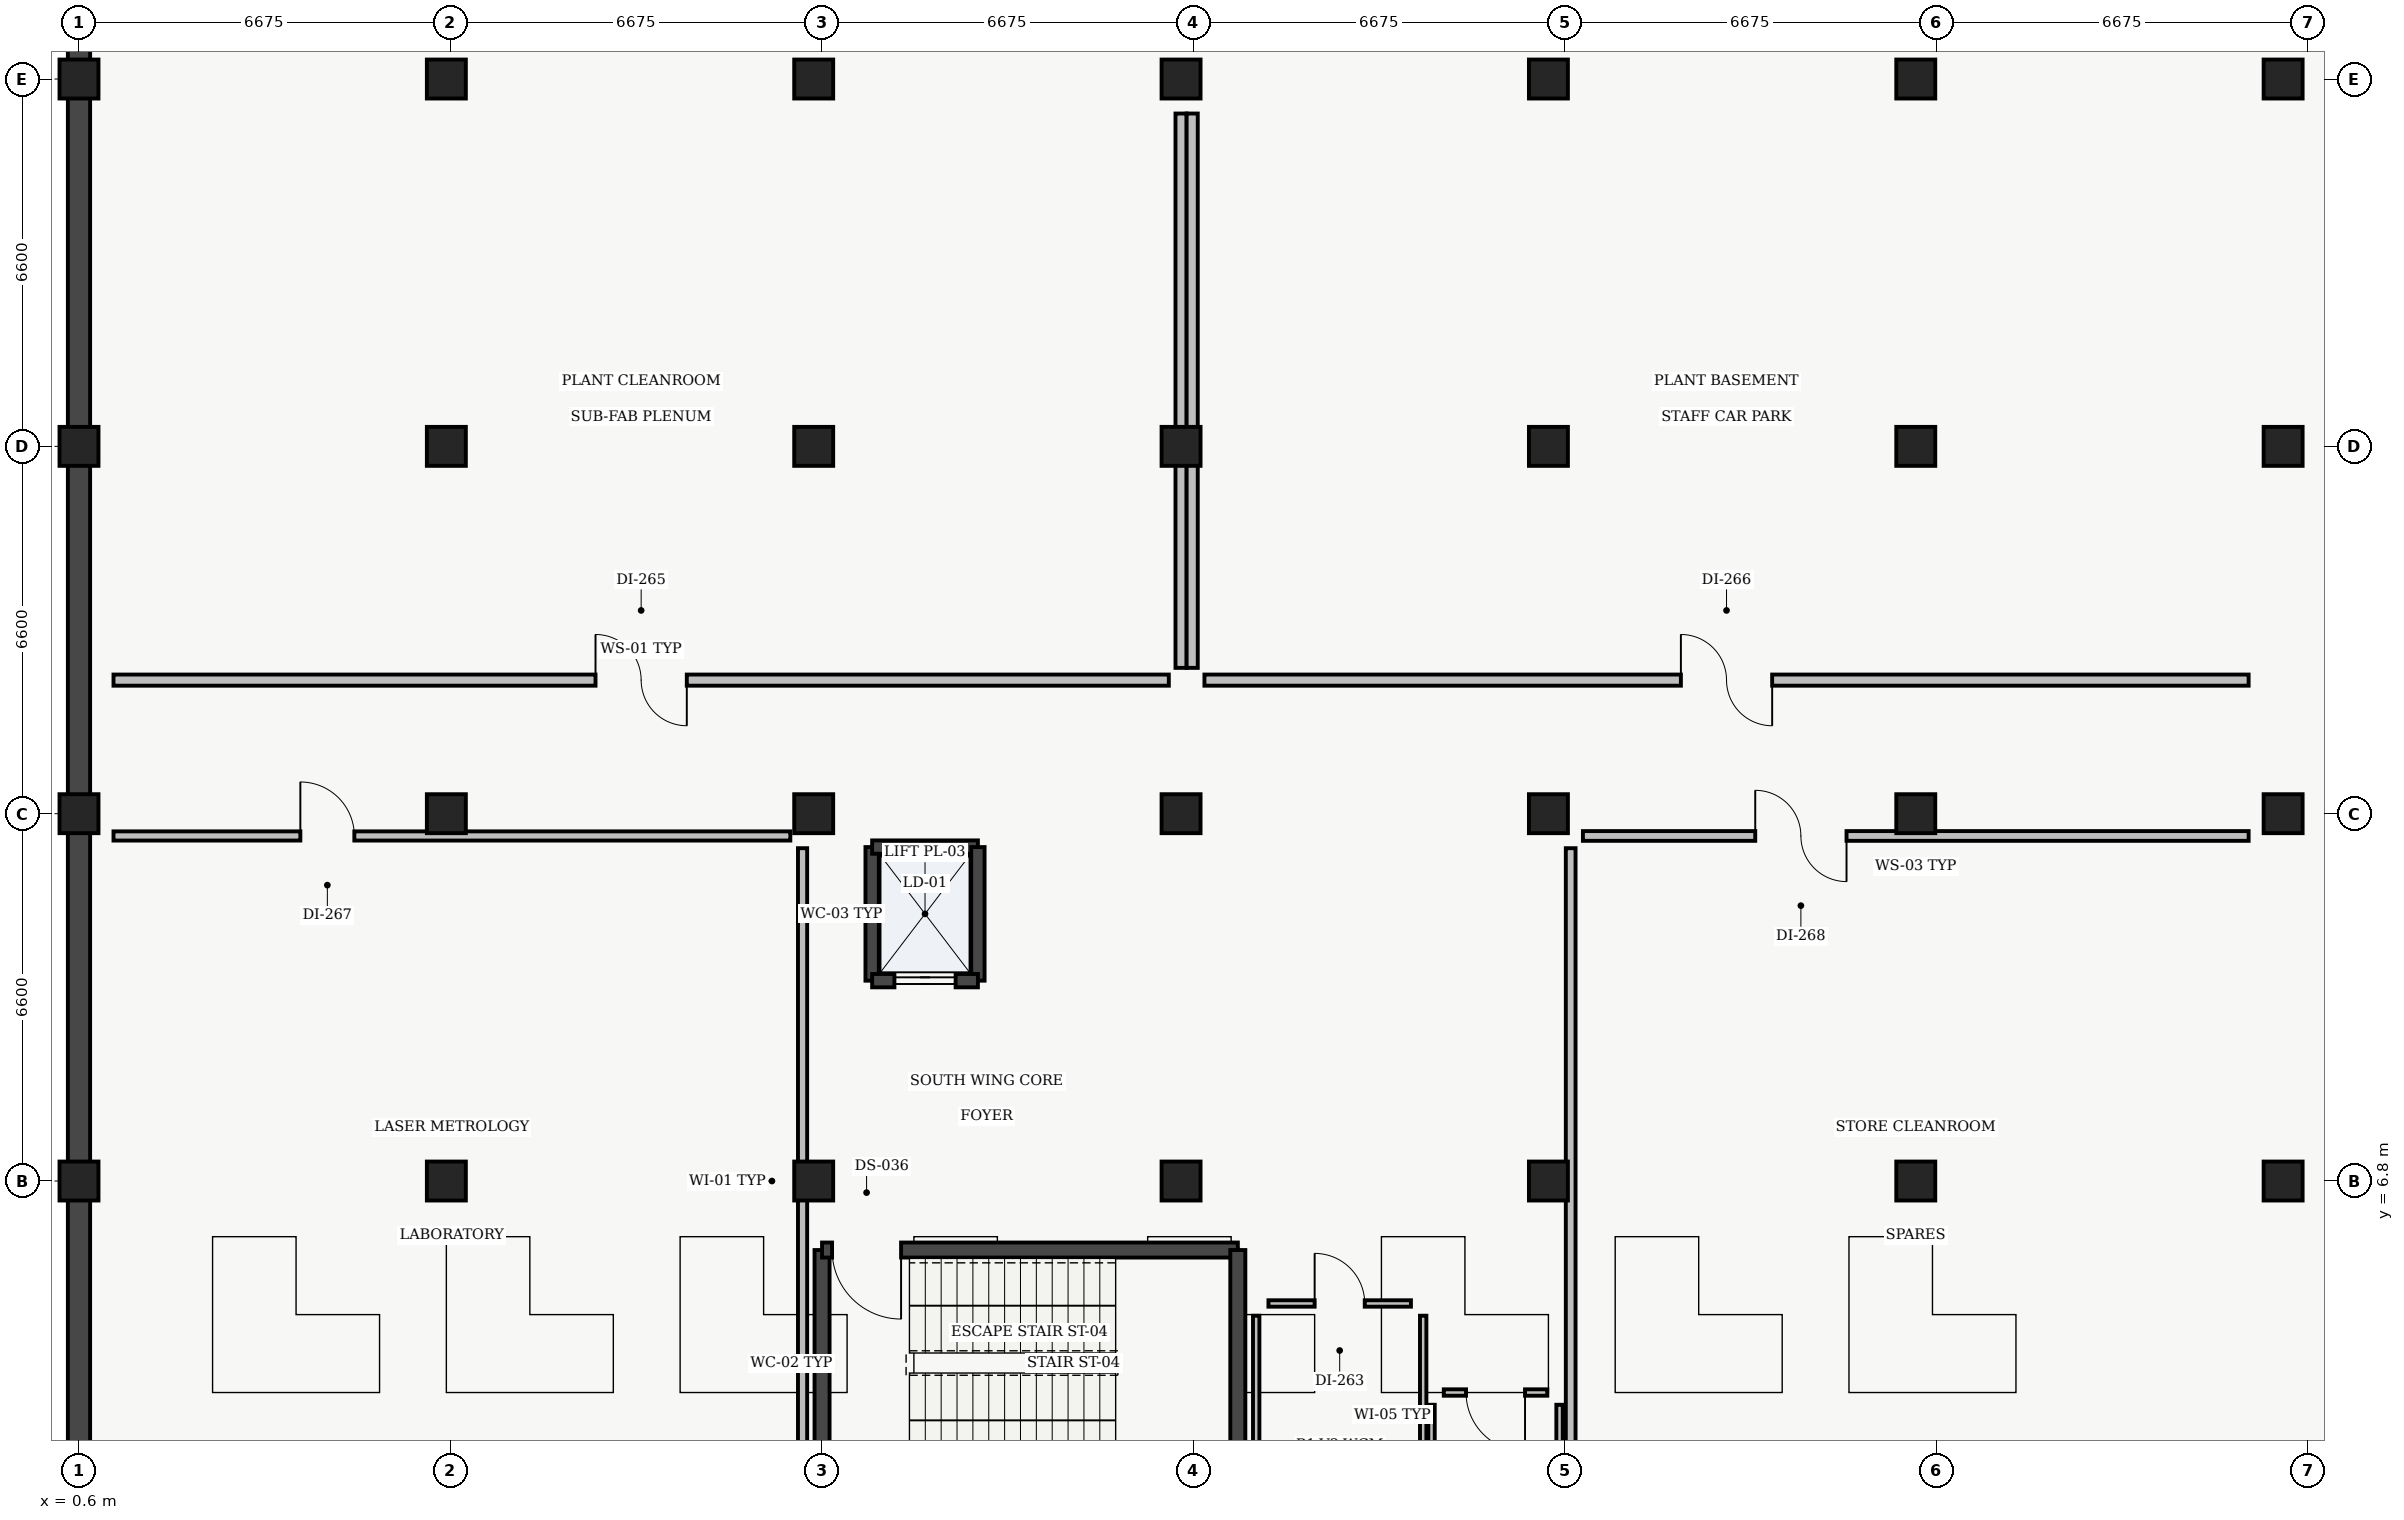
"""IFC4 building model, lengths in metres.
Left out: names, types, materials, properties, quantities, classifications, styles, units other than length and angle.
Written with IfcOpenShell. Run it as: python <this file> out.ifc"""

import sys

from ifc_helpers import new_model, si_unit, direction, frame, frame_2d, origin, origin_2d, place, context, subcontext, project, spatial, rectangle, extrude, element, fill, save


model = new_model("IFC4")
c1 = context("Model", 3, precision=1e-05, world=origin(), true_north=direction((0.0, 1.0)))
c2 = subcontext(c1, "Body", "Model", "MODEL_VIEW")
j1 = project(units=[si_unit("LENGTHUNIT", "METRE"), si_unit("PLANEANGLEUNIT", "RADIAN")], contexts=[c1])
p1 = place(None, origin())
s1 = spatial("IfcSite", under=j1, at=p1, CompositionType="ELEMENT")
p2 = place(p1, origin())
s2 = spatial("IfcBuilding", under=s1, at=p2, CompositionType="ELEMENT")
p3 = place(p2, frame((0.0, 0.0, -4.8)))
s3 = spatial("IfcBuildingStorey", under=s2, at=p3, CompositionType="ELEMENT", Elevation=-4.8)
for number, where, z_axis, x_axis in (
    (1, (0.6, 6.8, 0.0), (0.0, 0.0, 1.0), (1.0, 0.0, 0.0)),
    (2, (0.6, 13.4, 0.0), (0.0, 0.0, 1.0), (1.0, 0.0, 0.0)),
    (3, (0.6, 20.0, 0.0), (0.0, 0.0, 1.0), (1.0, 0.0, 0.0)),
    (4, (0.6, 26.6, 0.0), (0.0, 0.0, 1.0), (1.0, 0.0, 0.0)),
    (5, (7.2, 6.8, 0.0), (0.0, 0.0, 1.0), (1.0, 0.0, 0.0)),
    (6, (7.2, 13.4, 0.0), (0.0, 0.0, 1.0), (1.0, 0.0, 0.0)),
    (7, (7.2, 20.0, 0.0), (0.0, 0.0, 1.0), (1.0, 0.0, 0.0)),
    (8, (7.2, 26.6, 0.0), (0.0, 0.0, 1.0), (1.0, 0.0, 0.0)),
    (9, (13.8, 6.8, 0.0), (0.0, 0.0, 1.0), (1.0, 0.0, 0.0)),
    (10, (13.8, 13.4, 0.0), (0.0, 0.0, 1.0), (1.0, 0.0, 0.0)),
    (11, (13.8, 20.0, 0.0), (0.0, 0.0, 1.0), (1.0, 0.0, 0.0)),
    (12, (13.8, 26.6, 0.0), (0.0, 0.0, 1.0), (1.0, 0.0, 0.0)),
    (13, (20.4, 6.8, 0.0), (0.0, 0.0, 1.0), (1.0, 0.0, 0.0)),
    (14, (20.4, 13.4, 0.0), (0.0, 0.0, 1.0), (1.0, 0.0, 0.0)),
    (15, (20.4, 20.0, 0.0), (0.0, 0.0, 1.0), (1.0, 0.0, 0.0)),
    (16, (20.4, 26.6, 0.0), (0.0, 0.0, 1.0), (1.0, 0.0, 0.0)),
    (17, (27.0, 6.8, 0.0), (0.0, 0.0, 1.0), (1.0, 0.0, 0.0)),
    (18, (27.0, 13.4, 0.0), (0.0, 0.0, 1.0), (1.0, 0.0, 0.0)),
    (19, (27.0, 20.0, 0.0), (0.0, 0.0, 1.0), (1.0, 0.0, 0.0)),
    (20, (27.0, 26.6, 0.0), (0.0, 0.0, 1.0), (1.0, 0.0, 0.0)),
    (21, (33.6, 6.8, 0.0), (0.0, 0.0, 1.0), (1.0, 0.0, 0.0)),
    (22, (33.6, 13.4, 0.0), (0.0, 0.0, 1.0), (1.0, 0.0, 0.0)),
    (23, (33.6, 20.0, 0.0), (0.0, 0.0, 1.0), (1.0, 0.0, 0.0)),
    (24, (33.6, 26.6, 0.0), (0.0, 0.0, 1.0), (1.0, 0.0, 0.0)),
    (25, (40.2, 6.8, 0.0), (0.0, 0.0, 1.0), (1.0, 0.0, 0.0)),
    (26, (40.2, 13.4, 0.0), (0.0, 0.0, 1.0), (1.0, 0.0, 0.0)),
    (27, (40.2, 20.0, 0.0), (0.0, 0.0, 1.0), (1.0, 0.0, 0.0)),
    (28, (40.2, 26.6, 0.0), (0.0, 0.0, 1.0), (1.0, 0.0, 0.0)),
):
    element("IfcColumn", number, at=place(p3, frame(where, z_axis=z_axis, x_axis=x_axis)), inside=s3, PredefinedType="COLUMN", context=c2, shape_type="SweptSolid", body=[
        extrude(rectangle(XDim=0.7, YDim=0.7, at=origin_2d()), origin(), (0.0, 0.0, 1.0), 4.6),
    ])
p4 = place(p3, frame((0.6, 0.2, 0.0), z_axis=(0.0, 0.0, 1.0), x_axis=(0.0, 1.0, 0.0)))
e29 = element("IfcWall", 29, at=p4, inside=s3, PredefinedType="USERDEFINED", context=c2, shape_type="SweptSolid", body=[
    extrude(rectangle(XDim=61.4, YDim=0.4, at=frame_2d((30.7, 0.0))), origin(), (0.0, 0.0, 1.0), 4.58),
])
p5 = place(p3, frame((13.95, 1.5, 0.0), z_axis=(0.0, 0.0, 1.0), x_axis=(0.0, 1.0, 0.0)))
e30 = element("IfcWall", 30, at=p5, inside=s3, PredefinedType="SHEAR", context=c2, shape_type="SweptSolid", body=[
    extrude(rectangle(XDim=4.06, YDim=0.27, at=frame_2d((2.03, 0.0))), origin(), (0.0, 0.0, 1.0), 4.58),
])
p6 = place(p3, frame((13.95, 5.56, 0.0), z_axis=(0.0, 0.0, 1.0), x_axis=(1.0, 0.0, 0.0)))
e31 = element("IfcWall", 31, at=p6, inside=s3, PredefinedType="SHEAR", context=c2, shape_type="SweptSolid", body=[
    extrude(rectangle(XDim=7.47, YDim=0.27, at=frame_2d((3.735, 0.0))), origin(), (0.0, 0.0, 1.0), 4.58),
])
p7 = place(p6, frame((0.18, 0.0, 0.0)))
e32 = element("IfcOpeningElement", 32, at=p7, cuts=e31, PredefinedType="OPENING", context=c2, shape_type="SweptSolid", body=[
    extrude(rectangle(XDim=1.24, YDim=2.15, at=frame_2d((0.62, 1.075))), frame((0.0, 0.135, 0.0), z_axis=(0.0, -1.0, 0.0), x_axis=(1.0, 0.0, 0.0)), (0.0, 0.0, 1.0), 0.27),
])
p8 = place(p3, frame((21.42, 5.56, 0.0), z_axis=(0.0, 0.0, 1.0), x_axis=(0.0, -1.0, 0.0)))
e33 = element("IfcWall", 33, at=p8, inside=s3, PredefinedType="SHEAR", context=c2, shape_type="SweptSolid", body=[
    extrude(rectangle(XDim=4.06, YDim=0.27, at=frame_2d((2.03, 0.0))), origin(), (0.0, 0.0, 1.0), 4.58),
])
p9 = place(p3, frame((14.85, 10.4, 0.0), z_axis=(0.0, 0.0, 1.0), x_axis=(0.0, 1.0, 0.0)))
e34 = element("IfcWall", 34, at=p9, inside=s3, PredefinedType="SHEAR", context=c2, shape_type="SweptSolid", body=[
    extrude(rectangle(XDim=2.4, YDim=0.24, at=frame_2d((1.2, 0.0))), origin(), (0.0, 0.0, 1.0), 4.58),
])
p10 = place(p3, frame((14.85, 12.8, 0.0), z_axis=(0.0, 0.0, 1.0), x_axis=(1.0, 0.0, 0.0)))
e35 = element("IfcWall", 35, at=p10, inside=s3, PredefinedType="SHEAR", context=c2, shape_type="SweptSolid", body=[
    extrude(rectangle(XDim=1.9, YDim=0.24, at=frame_2d((0.95, 0.0))), origin(), (0.0, 0.0, 1.0), 4.58),
])
p11 = place(p3, frame((16.75, 12.8, 0.0), z_axis=(0.0, 0.0, 1.0), x_axis=(0.0, -1.0, 0.0)))
e36 = element("IfcWall", 36, at=p11, inside=s3, PredefinedType="SHEAR", context=c2, shape_type="SweptSolid", body=[
    extrude(rectangle(XDim=2.4, YDim=0.24, at=frame_2d((1.2, 0.0))), origin(), (0.0, 0.0, 1.0), 4.58),
])
p12 = place(p3, frame((16.75, 10.4, 0.0), z_axis=(0.0, 0.0, 1.0), x_axis=(-1.0, 0.0, 0.0)))
e37 = element("IfcWall", 37, at=p12, inside=s3, PredefinedType="SHEAR", context=c2, shape_type="SweptSolid", body=[
    extrude(rectangle(XDim=1.9, YDim=0.24, at=frame_2d((0.95, 0.0))), origin(), (0.0, 0.0, 1.0), 4.58),
])
p13 = place(p12, frame((0.4, 0.0, 0.0)))
e38 = element("IfcOpeningElement", 38, at=p13, cuts=e37, PredefinedType="OPENING", context=c2, shape_type="SweptSolid", body=[
    extrude(rectangle(XDim=1.1, YDim=2.2, at=frame_2d((0.55, 1.1))), frame((0.0, 0.12, 0.0), z_axis=(0.0, -1.0, 0.0), x_axis=(1.0, 0.0, 0.0)), (0.0, 0.0, 1.0), 0.24),
])
p14 = place(p3, frame((24.75, 0.82, 0.0), z_axis=(0.0, 0.0, 1.0), x_axis=(0.0, 1.0, 0.0)))
e39 = element("IfcWall", 39, at=p14, inside=s3, PredefinedType="PARTITIONING", context=c2, shape_type="SweptSolid", body=[
    extrude(rectangle(XDim=3.56, YDim=0.115, at=frame_2d((1.78, 0.0))), origin(), (0.0, 0.0, 1.0), 4.25),
])
p15 = place(p3, frame((24.53, 4.6, 0.0), z_axis=(0.0, 0.0, 1.0), x_axis=(-1.0, 0.0, 0.0)))
e40 = element("IfcWall", 40, at=p15, inside=s3, PredefinedType="PARTITIONING", context=c2, shape_type="SweptSolid", body=[
    extrude(rectangle(XDim=2.56, YDim=0.115, at=frame_2d((1.28, 0.0))), origin(), (0.0, 0.0, 1.0), 4.25),
])
p16 = place(p15, frame((0.83, 0.0, 0.0)))
e41 = element("IfcOpeningElement", 41, at=p16, cuts=e40, PredefinedType="OPENING", context=c2, shape_type="SweptSolid", body=[
    extrude(rectangle(XDim=0.9, YDim=2.1, at=frame_2d((0.45, 1.05))), frame((0.0, 0.058, 0.0), z_axis=(0.0, -1.0, 0.0), x_axis=(1.0, 0.0, 0.0)), (0.0, 0.0, 1.0), 0.115),
])
p17 = place(p3, frame((21.75, 4.38, 0.0), z_axis=(0.0, 0.0, 1.0), x_axis=(0.0, -1.0, 0.0)))
e42 = element("IfcWall", 42, at=p17, inside=s3, PredefinedType="PARTITIONING", context=c2, shape_type="SweptSolid", body=[
    extrude(rectangle(XDim=3.56, YDim=0.115, at=frame_2d((1.78, 0.0))), origin(), (0.0, 0.0, 1.0), 4.25),
])
p18 = place(p3, frame((27.2, 0.82, 0.0), z_axis=(0.0, 0.0, 1.0), x_axis=(0.0, 1.0, 0.0)))
e43 = element("IfcWall", 43, at=p18, inside=s3, PredefinedType="PARTITIONING", context=c2, shape_type="SweptSolid", body=[
    extrude(rectangle(XDim=1.96, YDim=0.115, at=frame_2d((0.98, 0.0))), origin(), (0.0, 0.0, 1.0), 3.935),
])
p19 = place(p3, frame((26.98, 3.0, 0.0), z_axis=(0.0, 0.0, 1.0), x_axis=(-1.0, 0.0, 0.0)))
e44 = element("IfcWall", 44, at=p19, inside=s3, PredefinedType="PARTITIONING", context=c2, shape_type="SweptSolid", body=[
    extrude(rectangle(XDim=1.86, YDim=0.115, at=frame_2d((0.93, 0.0))), origin(), (0.0, 0.0, 1.0), 4.25),
])
p20 = place(p19, frame((0.4, 0.0, 0.0)))
e45 = element("IfcOpeningElement", 45, at=p20, cuts=e44, PredefinedType="OPENING", context=c2, shape_type="SweptSolid", body=[
    extrude(rectangle(XDim=1.06, YDim=2.12, at=frame_2d((0.53, 1.06))), frame((0.0, 0.058, 0.0), z_axis=(0.0, -1.0, 0.0), x_axis=(1.0, 0.0, 0.0)), (0.0, 0.0, 1.0), 0.115),
])
p21 = place(p3, frame((24.9, 2.78, 0.0), z_axis=(0.0, 0.0, 1.0), x_axis=(0.0, -1.0, 0.0)))
e46 = element("IfcWall", 46, at=p21, inside=s3, PredefinedType="PARTITIONING", context=c2, shape_type="SweptSolid", body=[
    extrude(rectangle(XDim=1.96, YDim=0.115, at=frame_2d((0.98, 0.0))), origin(), (0.0, 0.0, 1.0), 4.25),
])
p22 = place(p3, frame((1.22, 15.8, 0.0), z_axis=(0.0, 0.0, 1.0), x_axis=(1.0, 0.0, 0.0)))
e47 = element("IfcWall", 47, at=p22, inside=s3, PredefinedType="SOLIDWALL", context=c2, shape_type="SweptSolid", body=[
    extrude(rectangle(XDim=18.96, YDim=0.2, at=frame_2d((9.48, 0.0))), origin(), (0.0, 0.0, 1.0), 4.135),
])
p23 = place(p22, frame((8.66, 0.0, 0.0)))
e48 = element("IfcOpeningElement", 48, at=p23, cuts=e47, PredefinedType="OPENING", context=c2, shape_type="SweptSolid", body=[
    extrude(rectangle(XDim=1.64, YDim=2.2, at=frame_2d((0.82, 1.1))), frame((0.0, 0.1, 0.0), z_axis=(0.0, -1.0, 0.0), x_axis=(1.0, 0.0, 0.0)), (0.0, 0.0, 1.0), 0.2),
])
p24 = place(p3, frame((20.4, 16.02, 0.0), z_axis=(0.0, 0.0, 1.0), x_axis=(0.0, 1.0, 0.0)))
e49 = element("IfcWall", 49, at=p24, inside=s3, PredefinedType="SOLIDWALL", context=c2, shape_type="SweptSolid", body=[
    extrude(rectangle(XDim=9.96, YDim=0.2, at=frame_2d((4.98, 0.0))), origin(), (0.0, 0.0, 1.0), 3.935),
])
p25 = place(p3, frame((20.82, 15.8, 0.0), z_axis=(0.0, 0.0, 1.0), x_axis=(1.0, 0.0, 0.0)))
e50 = element("IfcWall", 50, at=p25, inside=s3, PredefinedType="SOLIDWALL", context=c2, shape_type="SweptSolid", body=[
    extrude(rectangle(XDim=18.76, YDim=0.2, at=frame_2d((9.38, 0.0))), origin(), (0.0, 0.0, 1.0), 4.135),
])
p26 = place(p25, frame((8.56, 0.0, 0.0)))
e51 = element("IfcOpeningElement", 51, at=p26, cuts=e50, PredefinedType="OPENING", context=c2, shape_type="SweptSolid", body=[
    extrude(rectangle(XDim=1.64, YDim=2.2, at=frame_2d((0.82, 1.1))), frame((0.0, 0.1, 0.0), z_axis=(0.0, -1.0, 0.0), x_axis=(1.0, 0.0, 0.0)), (0.0, 0.0, 1.0), 0.2),
])
p27 = place(p3, frame((20.6, 25.98, 0.0), z_axis=(0.0, 0.0, 1.0), x_axis=(0.0, -1.0, 0.0)))
e52 = element("IfcWall", 52, at=p27, inside=s3, PredefinedType="SOLIDWALL", context=c2, shape_type="SweptSolid", body=[
    extrude(rectangle(XDim=9.96, YDim=0.2, at=frame_2d((4.98, 0.0))), origin(), (0.0, 0.0, 1.0), 3.935),
])
p28 = place(p3, frame((13.6, 0.82, 0.0), z_axis=(0.0, 0.0, 1.0), x_axis=(0.0, 1.0, 0.0)))
e53 = element("IfcWall", 53, at=p28, inside=s3, PredefinedType="PARTITIONING", context=c2, shape_type="SweptSolid", body=[
    extrude(rectangle(XDim=11.96, YDim=0.165, at=frame_2d((5.98, 0.0))), origin(), (0.0, 0.0, 1.0), 3.935),
])
p29 = place(p3, frame((13.38, 13.0, 0.0), z_axis=(0.0, 0.0, 1.0), x_axis=(-1.0, 0.0, 0.0)))
e54 = element("IfcWall", 54, at=p29, inside=s3, PredefinedType="PARTITIONING", context=c2, shape_type="SweptSolid", body=[
    extrude(rectangle(XDim=12.16, YDim=0.165, at=frame_2d((6.08, 0.0))), origin(), (0.0, 0.0, 1.0), 4.25),
])
p30 = place(p29, frame((7.833, 0.0, 0.0)))
e55 = element("IfcOpeningElement", 55, at=p30, cuts=e54, PredefinedType="OPENING", context=c2, shape_type="SweptSolid", body=[
    extrude(rectangle(XDim=0.97, YDim=2.12, at=frame_2d((0.485, 1.06))), frame((0.0, 0.083, 0.0), z_axis=(0.0, -1.0, 0.0), x_axis=(1.0, 0.0, 0.0)), (0.0, 0.0, 1.0), 0.165),
])
p31 = place(p3, frame((39.58, 13.0, 0.0), z_axis=(0.0, 0.0, 1.0), x_axis=(-1.0, 0.0, 0.0)))
e56 = element("IfcWall", 56, at=p31, inside=s3, PredefinedType="SOLIDWALL", context=c2, shape_type="SweptSolid", body=[
    extrude(rectangle(XDim=11.96, YDim=0.175, at=frame_2d((5.98, 0.0))), origin(), (0.0, 0.0, 1.0), 4.25),
])
p32 = place(p31, frame((7.224, 0.0, 0.0)))
e57 = element("IfcOpeningElement", 57, at=p32, cuts=e56, PredefinedType="OPENING", context=c2, shape_type="SweptSolid", body=[
    extrude(rectangle(XDim=1.64, YDim=2.2, at=frame_2d((0.82, 1.1))), frame((0.0, 0.087, 0.0), z_axis=(0.0, -1.0, 0.0), x_axis=(1.0, 0.0, 0.0)), (0.0, 0.0, 1.0), 0.175),
])
p33 = place(p3, frame((27.4, 12.78, 0.0), z_axis=(0.0, 0.0, 1.0), x_axis=(0.0, -1.0, 0.0)))
e58 = element("IfcWall", 58, at=p33, inside=s3, PredefinedType="SOLIDWALL", context=c2, shape_type="SweptSolid", body=[
    extrude(rectangle(XDim=11.96, YDim=0.175, at=frame_2d((5.98, 0.0))), origin(), (0.0, 0.0, 1.0), 4.25),
])
p34 = place(p7, origin())
e59 = element("IfcDoor", 59, at=p34, inside=s3, OperationType="SINGLE_SWING_RIGHT", PredefinedType="DOOR", context=c2, shape_type="SweptSolid", body=[
    extrude(rectangle(XDim=1.24, YDim=2.15, at=frame_2d((0.62, 1.075))), frame((0.0, 0.025, 0.0), z_axis=(0.0, -1.0, 0.0), x_axis=(1.0, 0.0, 0.0)), (0.0, 0.0, 1.0), 0.05),
])
fill(e32, e59)
p35 = place(p13, origin())
e60 = element("IfcDoor", 60, at=p35, inside=s3, OperationType="SLIDING_TO_LEFT", PredefinedType="DOOR", context=c2, shape_type="SweptSolid", body=[
    extrude(rectangle(XDim=1.1, YDim=2.2, at=frame_2d((0.55, 1.1))), frame((0.0, 0.025, 0.0), z_axis=(0.0, -1.0, 0.0), x_axis=(1.0, 0.0, 0.0)), (0.0, 0.0, 1.0), 0.05),
])
fill(e38, e60)
p36 = place(p16, origin())
e61 = element("IfcDoor", 61, at=p36, inside=s3, OperationType="SINGLE_SWING_RIGHT", PredefinedType="DOOR", context=c2, shape_type="SweptSolid", body=[
    extrude(rectangle(XDim=0.9, YDim=2.1, at=frame_2d((0.45, 1.05))), frame((0.0, 0.025, 0.0), z_axis=(0.0, -1.0, 0.0), x_axis=(1.0, 0.0, 0.0)), (0.0, 0.0, 1.0), 0.05),
])
fill(e41, e61)
p37 = place(p20, origin())
e62 = element("IfcDoor", 62, at=p37, inside=s3, OperationType="SINGLE_SWING_LEFT", PredefinedType="DOOR", context=c2, shape_type="SweptSolid", body=[
    extrude(rectangle(XDim=1.06, YDim=2.12, at=frame_2d((0.53, 1.06))), frame((0.0, 0.025, 0.0), z_axis=(0.0, -1.0, 0.0), x_axis=(1.0, 0.0, 0.0)), (0.0, 0.0, 1.0), 0.05),
])
fill(e45, e62)
p38 = place(p23, origin())
e63 = element("IfcDoor", 63, at=p38, inside=s3, OperationType="DOUBLE_DOOR_SINGLE_SWING", PredefinedType="DOOR", context=c2, shape_type="SweptSolid", body=[
    extrude(rectangle(XDim=1.64, YDim=2.2, at=frame_2d((0.82, 1.1))), frame((0.0, 0.025, 0.0), z_axis=(0.0, -1.0, 0.0), x_axis=(1.0, 0.0, 0.0)), (0.0, 0.0, 1.0), 0.05),
])
fill(e48, e63)
p39 = place(p26, origin())
e64 = element("IfcDoor", 64, at=p39, inside=s3, OperationType="DOUBLE_DOOR_SINGLE_SWING", PredefinedType="DOOR", context=c2, shape_type="SweptSolid", body=[
    extrude(rectangle(XDim=1.64, YDim=2.2, at=frame_2d((0.82, 1.1))), frame((0.0, 0.025, 0.0), z_axis=(0.0, -1.0, 0.0), x_axis=(1.0, 0.0, 0.0)), (0.0, 0.0, 1.0), 0.05),
])
fill(e51, e64)
p40 = place(p30, origin())
e65 = element("IfcDoor", 65, at=p40, inside=s3, OperationType="SINGLE_SWING_RIGHT", PredefinedType="DOOR", context=c2, shape_type="SweptSolid", body=[
    extrude(rectangle(XDim=0.97, YDim=2.12, at=frame_2d((0.485, 1.06))), frame((0.0, 0.025, 0.0), z_axis=(0.0, -1.0, 0.0), x_axis=(1.0, 0.0, 0.0)), (0.0, 0.0, 1.0), 0.05),
])
fill(e55, e65)
p41 = place(p32, origin())
e66 = element("IfcDoor", 66, at=p41, inside=s3, OperationType="DOUBLE_DOOR_SINGLE_SWING", PredefinedType="DOOR", context=c2, shape_type="SweptSolid", body=[
    extrude(rectangle(XDim=1.64, YDim=2.2, at=frame_2d((0.82, 1.1))), frame((0.0, 0.025, 0.0), z_axis=(0.0, -1.0, 0.0), x_axis=(1.0, 0.0, 0.0)), (0.0, 0.0, 1.0), 0.05),
])
fill(e57, e66)
save(model, sys.argv[1])
